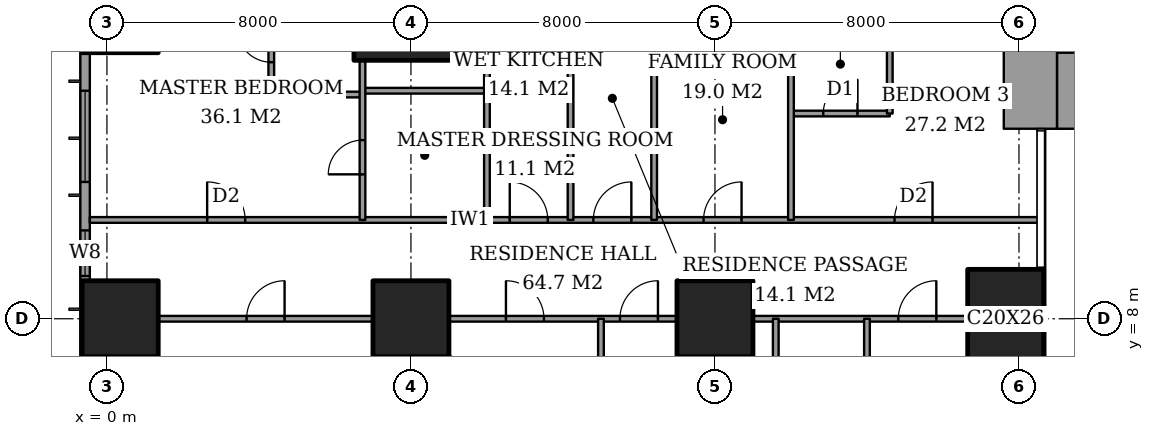
"""IFC4 building model, lengths in metres.
Left out: names, types, materials, properties, quantities, classifications, styles, units other than length and angle.
Written with IfcOpenShell. Run it as: python <this file> out.ifc"""

import sys

from ifc_helpers import new_model, si_unit, direction, frame, frame_2d, origin, origin_2d, place, context, subcontext, project, spatial, rectangle, extrude, element, fill, save


model = new_model("IFC4")
c1 = context("Model", 3, precision=1e-05, world=origin(), true_north=direction((0.0, 1.0)))
c2 = subcontext(c1, "Body", "Model", "MODEL_VIEW")
j1 = project(units=[si_unit("LENGTHUNIT", "METRE"), si_unit("PLANEANGLEUNIT", "RADIAN")], contexts=[c1])
p1 = place(None, origin())
s1 = spatial("IfcSite", under=j1, at=p1, CompositionType="ELEMENT")
p2 = place(p1, origin())
s2 = spatial("IfcBuilding", under=s1, at=p2, CompositionType="ELEMENT")
p3 = place(p2, frame((0.0, 0.0, 36.8)))
s3 = spatial("IfcBuildingStorey", under=s2, at=p3, CompositionType="ELEMENT", Elevation=36.8)
for number, where, z_axis, x_axis in (
    (1, (0.35, 8.0, 0.0), (0.0, 0.0, 1.0), (1.0, 0.0, 0.0)),
    (2, (8.0, 8.0, 0.0), (0.0, 0.0, 1.0), (1.0, 0.0, 0.0)),
):
    element("IfcColumn", number, at=place(p3, frame(where, z_axis=z_axis, x_axis=x_axis)), inside=s3, PredefinedType="COLUMN", context=c2, shape_type="SweptSolid", body=[
        extrude(rectangle(XDim=2.0, YDim=2.0, at=origin_2d()), origin(), (0.0, 0.0, 1.0), 3.6),
    ])
p4 = place(p3, frame((8.0, 16.0, 0.0), z_axis=(0.0, 0.0, 1.0), x_axis=(1.0, 0.0, 0.0)))
e3 = element("IfcColumn", 3, at=p4, inside=s3, PredefinedType="COLUMN", context=c2, shape_type="SweptSolid", body=[
    extrude(rectangle(XDim=3.0, YDim=2.4, at=origin_2d()), origin(), (0.0, 0.0, 1.0), 3.6),
])
p5 = place(p3, frame((16.0, 8.0, 0.0), z_axis=(0.0, 0.0, 1.0), x_axis=(1.0, 0.0, 0.0)))
e4 = element("IfcColumn", 4, at=p5, inside=s3, PredefinedType="COLUMN", context=c2, shape_type="SweptSolid", body=[
    extrude(rectangle(XDim=2.0, YDim=2.0, at=origin_2d()), origin(), (0.0, 0.0, 1.0), 3.6),
])
p6 = place(p3, frame((16.0, 16.0, 0.0), z_axis=(0.0, 0.0, 1.0), x_axis=(1.0, 0.0, 0.0)))
e5 = element("IfcColumn", 5, at=p6, inside=s3, PredefinedType="COLUMN", context=c2, shape_type="SweptSolid", body=[
    extrude(rectangle(XDim=3.0, YDim=2.4, at=origin_2d()), origin(), (0.0, 0.0, 1.0), 3.6),
])
p7 = place(p3, frame((23.65, 8.0, 0.0), z_axis=(0.0, 0.0, 1.0), x_axis=(1.0, 0.0, 0.0)))
e6 = element("IfcColumn", 6, at=p7, inside=s3, PredefinedType="COLUMN", context=c2, shape_type="SweptSolid", body=[
    extrude(rectangle(XDim=2.0, YDim=2.6, at=origin_2d()), origin(), (0.0, 0.0, 1.0), 3.6),
])
p8 = place(p3, frame((25.0, 14.0, 0.0), z_axis=(0.0, 0.0, 1.0), x_axis=(1.0, 0.0, 0.0)))
e7 = element("IfcWall", 7, at=p8, inside=s3, PredefinedType="SHEAR", context=c2, shape_type="SweptSolid", body=[
    extrude(rectangle(XDim=3.15, YDim=2.0, at=frame_2d((1.575, 0.0))), origin(), (0.0, 0.0, 1.0), 3.6),
])
p9 = place(p3, frame((24.3, 13.0, 0.0), z_axis=(0.0, 0.0, 1.0), x_axis=(0.0, 1.0, 0.0)))
e8 = element("IfcWall", 8, at=p9, inside=s3, PredefinedType="SHEAR", context=c2, shape_type="SweptSolid", body=[
    extrude(rectangle(XDim=10.15, YDim=1.4, at=frame_2d((5.075, 0.0))), origin(), (0.0, 0.0, 1.0), 3.6),
])
p10 = place(p3, frame((-0.575, 44.825, 0.0), z_axis=(0.0, 0.0, 1.0), x_axis=(0.0, -1.0, 0.0)))
e9 = element("IfcWall", 9, at=p10, inside=s3, PredefinedType="SOLIDWALL", context=c2, shape_type="SweptSolid", body=[
    extrude(rectangle(XDim=41.65, YDim=0.25, at=frame_2d((20.825, 0.0))), origin(), (0.0, 0.0, 1.0), 3.6),
])
p11 = place(p10, frame((0.775, 0.0, 0.6)))
e10 = element("IfcOpeningElement", 10, at=p11, cuts=e9, PredefinedType="OPENING", context=c2, shape_type="SweptSolid", body=[
    extrude(rectangle(XDim=2.4, YDim=2.0, at=frame_2d((1.2, 1.0))), frame((0.0, 0.135, 0.0), z_axis=(0.0, -1.0, 0.0), x_axis=(1.0, 0.0, 0.0)), (0.0, 0.0, 1.0), 0.27),
])
p12 = place(p10, frame((6.1, 0.0, 0.6)))
e11 = element("IfcOpeningElement", 11, at=p12, cuts=e9, PredefinedType="OPENING", context=c2, shape_type="SweptSolid", body=[
    extrude(rectangle(XDim=1.2, YDim=2.0, at=frame_2d((0.6, 1.0))), frame((0.0, 0.135, 0.0), z_axis=(0.0, -1.0, 0.0), x_axis=(1.0, 0.0, 0.0)), (0.0, 0.0, 1.0), 0.27),
])
p13 = place(p10, frame((8.425, 0.0, 0.6)))
e12 = element("IfcOpeningElement", 12, at=p13, cuts=e9, PredefinedType="OPENING", context=c2, shape_type="SweptSolid", body=[
    extrude(rectangle(XDim=2.4, YDim=2.0, at=frame_2d((1.2, 1.0))), frame((0.0, 0.135, 0.0), z_axis=(0.0, -1.0, 0.0), x_axis=(1.0, 0.0, 0.0)), (0.0, 0.0, 1.0), 0.27),
])
p14 = place(p10, frame((15.625, 0.0, 0.6)))
e13 = element("IfcOpeningElement", 13, at=p14, cuts=e9, PredefinedType="OPENING", context=c2, shape_type="SweptSolid", body=[
    extrude(rectangle(XDim=2.4, YDim=2.0, at=frame_2d((1.2, 1.0))), frame((0.0, 0.135, 0.0), z_axis=(0.0, -1.0, 0.0), x_axis=(1.0, 0.0, 0.0)), (0.0, 0.0, 1.0), 0.27),
])
p15 = place(p10, frame((23.625, 0.0, 0.6)))
e14 = element("IfcOpeningElement", 14, at=p15, cuts=e9, PredefinedType="OPENING", context=c2, shape_type="SweptSolid", body=[
    extrude(rectangle(XDim=2.4, YDim=2.0, at=frame_2d((1.2, 1.0))), frame((0.0, 0.135, 0.0), z_axis=(0.0, -1.0, 0.0), x_axis=(1.0, 0.0, 0.0)), (0.0, 0.0, 1.0), 0.27),
])
p16 = place(p10, frame((30.825, 0.0, 0.6)))
e15 = element("IfcOpeningElement", 15, at=p16, cuts=e9, PredefinedType="OPENING", context=c2, shape_type="SweptSolid", body=[
    extrude(rectangle(XDim=2.4, YDim=2.0, at=frame_2d((1.2, 1.0))), frame((0.0, 0.135, 0.0), z_axis=(0.0, -1.0, 0.0), x_axis=(1.0, 0.0, 0.0)), (0.0, 0.0, 1.0), 0.27),
])
p17 = place(p10, frame((34.5, 0.0, 0.6)))
e16 = element("IfcOpeningElement", 16, at=p17, cuts=e9, PredefinedType="OPENING", context=c2, shape_type="SweptSolid", body=[
    extrude(rectangle(XDim=1.2, YDim=2.0, at=frame_2d((0.6, 1.0))), frame((0.0, 0.135, 0.0), z_axis=(0.0, -1.0, 0.0), x_axis=(1.0, 0.0, 0.0)), (0.0, 0.0, 1.0), 0.27),
])
p18 = place(p10, frame((38.475, 0.0, 0.6)))
e17 = element("IfcOpeningElement", 17, at=p18, cuts=e9, PredefinedType="OPENING", context=c2, shape_type="SweptSolid", body=[
    extrude(rectangle(XDim=2.4, YDim=2.0, at=frame_2d((1.2, 1.0))), frame((0.0, 0.135, 0.0), z_axis=(0.0, -1.0, 0.0), x_axis=(1.0, 0.0, 0.0)), (0.0, 0.0, 1.0), 0.27),
])
p19 = place(p3, frame((1.35, 8.0, 0.0), z_axis=(0.0, 0.0, 1.0), x_axis=(1.0, 0.0, 0.0)))
e18 = element("IfcWall", 18, at=p19, inside=s3, PredefinedType="PARTITIONING", context=c2, shape_type="SweptSolid", body=[
    extrude(rectangle(XDim=5.65, YDim=0.15, at=frame_2d((2.825, 0.0))), origin(), (0.0, 0.0, 1.0), 3.35),
])
p20 = place(p19, frame((2.325, 0.0, 0.0)))
e19 = element("IfcOpeningElement", 19, at=p20, cuts=e18, PredefinedType="OPENING", context=c2, shape_type="SweptSolid", body=[
    extrude(rectangle(XDim=1.0, YDim=2.1, at=frame_2d((0.5, 1.05))), frame((0.0, 0.085, 0.0), z_axis=(0.0, -1.0, 0.0), x_axis=(1.0, 0.0, 0.0)), (0.0, 0.0, 1.0), 0.17),
])
p21 = place(p3, frame((9.0, 8.0, 0.0), z_axis=(0.0, 0.0, 1.0), x_axis=(1.0, 0.0, 0.0)))
e20 = element("IfcWall", 20, at=p21, inside=s3, PredefinedType="PARTITIONING", context=c2, shape_type="SweptSolid", body=[
    extrude(rectangle(XDim=6.0, YDim=0.15, at=frame_2d((3.0, 0.0))), origin(), (0.0, 0.0, 1.0), 3.35),
])
p22 = place(p21, frame((1.5, 0.0, 0.0)))
e21 = element("IfcOpeningElement", 21, at=p22, cuts=e20, PredefinedType="OPENING", context=c2, shape_type="SweptSolid", body=[
    extrude(rectangle(XDim=1.0, YDim=2.1, at=frame_2d((0.5, 1.05))), frame((0.0, 0.085, 0.0), z_axis=(0.0, -1.0, 0.0), x_axis=(1.0, 0.0, 0.0)), (0.0, 0.0, 1.0), 0.17),
])
p23 = place(p21, frame((4.5, 0.0, 0.0)))
e22 = element("IfcOpeningElement", 22, at=p23, cuts=e20, PredefinedType="OPENING", context=c2, shape_type="SweptSolid", body=[
    extrude(rectangle(XDim=1.0, YDim=2.1, at=frame_2d((0.5, 1.05))), frame((0.0, 0.085, 0.0), z_axis=(0.0, -1.0, 0.0), x_axis=(1.0, 0.0, 0.0)), (0.0, 0.0, 1.0), 0.17),
])
p24 = place(p3, frame((17.0, 8.0, 0.0), z_axis=(0.0, 0.0, 1.0), x_axis=(1.0, 0.0, 0.0)))
e23 = element("IfcWall", 23, at=p24, inside=s3, PredefinedType="PARTITIONING", context=c2, shape_type="SweptSolid", body=[
    extrude(rectangle(XDim=5.65, YDim=0.15, at=frame_2d((2.825, 0.0))), origin(), (0.0, 0.0, 1.0), 3.35),
])
p25 = place(p24, frame((3.825, 0.0, 0.0)))
e24 = element("IfcOpeningElement", 24, at=p25, cuts=e23, PredefinedType="OPENING", context=c2, shape_type="SweptSolid", body=[
    extrude(rectangle(XDim=1.0, YDim=2.1, at=frame_2d((0.5, 1.05))), frame((0.0, 0.085, 0.0), z_axis=(0.0, -1.0, 0.0), x_axis=(1.0, 0.0, 0.0)), (0.0, 0.0, 1.0), 0.17),
])
p26 = place(p3, frame((-0.45, 10.6, 0.0), z_axis=(0.0, 0.0, 1.0), x_axis=(1.0, 0.0, 0.0)))
e25 = element("IfcWall", 25, at=p26, inside=s3, PredefinedType="PARTITIONING", context=c2, shape_type="SweptSolid", body=[
    extrude(rectangle(XDim=25.011, YDim=0.15, at=frame_2d((12.505, 0.0))), origin(), (0.0, 0.0, 1.0), 3.35),
])
p27 = place(p26, frame((13.25, 0.0, 0.0)))
e26 = element("IfcOpeningElement", 26, at=p27, cuts=e25, PredefinedType="OPENING", context=c2, shape_type="SweptSolid", body=[
    extrude(rectangle(XDim=1.0, YDim=2.1, at=frame_2d((0.5, 1.05))), frame((0.0, 0.085, 0.0), z_axis=(0.0, -1.0, 0.0), x_axis=(1.0, 0.0, 0.0)), (0.0, 0.0, 1.0), 0.17),
])
p28 = place(p26, frame((3.087, 0.0, 0.0)))
e27 = element("IfcOpeningElement", 27, at=p28, cuts=e25, PredefinedType="OPENING", context=c2, shape_type="SweptSolid", body=[
    extrude(rectangle(XDim=1.0, YDim=2.1, at=frame_2d((0.5, 1.05))), frame((0.0, 0.085, 0.0), z_axis=(0.0, -1.0, 0.0), x_axis=(1.0, 0.0, 0.0)), (0.0, 0.0, 1.0), 0.17),
])
p29 = place(p26, frame((11.05, 0.0, 0.0)))
e28 = element("IfcOpeningElement", 28, at=p29, cuts=e25, PredefinedType="OPENING", context=c2, shape_type="SweptSolid", body=[
    extrude(rectangle(XDim=1.0, YDim=2.1, at=frame_2d((0.5, 1.05))), frame((0.0, 0.085, 0.0), z_axis=(0.0, -1.0, 0.0), x_axis=(1.0, 0.0, 0.0)), (0.0, 0.0, 1.0), 0.17),
])
p30 = place(p26, frame((16.15, 0.0, 0.0)))
e29 = element("IfcOpeningElement", 29, at=p30, cuts=e25, PredefinedType="OPENING", context=c2, shape_type="SweptSolid", body=[
    extrude(rectangle(XDim=1.0, YDim=2.1, at=frame_2d((0.5, 1.05))), frame((0.0, 0.085, 0.0), z_axis=(0.0, -1.0, 0.0), x_axis=(1.0, 0.0, 0.0)), (0.0, 0.0, 1.0), 0.17),
])
p31 = place(p26, frame((21.175, 0.0, 0.0)))
e30 = element("IfcOpeningElement", 30, at=p31, cuts=e25, PredefinedType="OPENING", context=c2, shape_type="SweptSolid", body=[
    extrude(rectangle(XDim=1.0, YDim=2.1, at=frame_2d((0.5, 1.05))), frame((0.0, 0.085, 0.0), z_axis=(0.0, -1.0, 0.0), x_axis=(1.0, 0.0, 0.0)), (0.0, 0.0, 1.0), 0.17),
])
p32 = place(p3, frame((18.0, 13.4, 0.0), z_axis=(0.0, 0.0, 1.0), x_axis=(1.0, 0.0, 0.0)))
e31 = element("IfcWall", 31, at=p32, inside=s3, PredefinedType="PARTITIONING", context=c2, shape_type="SweptSolid", body=[
    extrude(rectangle(XDim=2.6, YDim=0.15, at=frame_2d((1.3, 0.0))), origin(), (0.0, 0.0, 1.0), 3.35),
])
p33 = place(p32, frame((0.85, 0.0, 0.0)))
e32 = element("IfcOpeningElement", 32, at=p33, cuts=e31, PredefinedType="OPENING", context=c2, shape_type="SweptSolid", body=[
    extrude(rectangle(XDim=0.9, YDim=2.1, at=frame_2d((0.45, 1.05))), frame((0.0, 0.085, 0.0), z_axis=(0.0, -1.0, 0.0), x_axis=(1.0, 0.0, 0.0)), (0.0, 0.0, 1.0), 0.17),
])
p34 = place(p3, frame((4.325, 13.9, 0.0), z_axis=(0.0, 0.0, 1.0), x_axis=(1.0, 0.0, 0.0)))
e33 = element("IfcWall", 33, at=p34, inside=s3, PredefinedType="PARTITIONING", context=c2, shape_type="SweptSolid", body=[
    extrude(rectangle(XDim=2.4, YDim=0.15, at=frame_2d((1.2, 0.0))), origin(), (0.0, 0.0, 1.0), 3.35),
])
p35 = place(p3, frame((6.725, 14.0, 0.0), z_axis=(0.0, 0.0, 1.0), x_axis=(1.0, 0.0, 0.0)))
e34 = element("IfcWall", 34, at=p35, inside=s3, PredefinedType="PARTITIONING", context=c2, shape_type="SweptSolid", body=[
    extrude(rectangle(XDim=3.275, YDim=0.15, at=frame_2d((1.637, 0.0))), origin(), (0.0, 0.0, 1.0), 3.35),
])
p36 = place(p3, frame((4.325, 13.9, 0.0), z_axis=(0.0, 0.0, 1.0), x_axis=(0.0, 1.0, 0.0)))
e35 = element("IfcWall", 35, at=p36, inside=s3, PredefinedType="PARTITIONING", context=c2, shape_type="SweptSolid", body=[
    extrude(rectangle(XDim=2.6, YDim=0.15, at=frame_2d((1.3, 0.0))), origin(), (0.0, 0.0, 1.0), 3.35),
])
p37 = place(p36, frame((0.85, 0.0, 0.0)))
e36 = element("IfcOpeningElement", 36, at=p37, cuts=e35, PredefinedType="OPENING", context=c2, shape_type="SweptSolid", body=[
    extrude(rectangle(XDim=0.9, YDim=2.1, at=frame_2d((0.45, 1.05))), frame((0.0, 0.085, 0.0), z_axis=(0.0, -1.0, 0.0), x_axis=(1.0, 0.0, 0.0)), (0.0, 0.0, 1.0), 0.17),
])
p38 = place(p3, frame((6.725, 10.6, 0.0), z_axis=(0.0, 0.0, 1.0), x_axis=(0.0, 1.0, 0.0)))
e37 = element("IfcWall", 37, at=p38, inside=s3, PredefinedType="PARTITIONING", context=c2, shape_type="SweptSolid", body=[
    extrude(rectangle(XDim=4.2, YDim=0.15, at=frame_2d((2.1, 0.0))), origin(), (0.0, 0.0, 1.0), 3.35),
])
p39 = place(p38, frame((1.2, 0.0, 0.0)))
e38 = element("IfcOpeningElement", 38, at=p39, cuts=e37, PredefinedType="OPENING", context=c2, shape_type="SweptSolid", body=[
    extrude(rectangle(XDim=0.9, YDim=2.1, at=frame_2d((0.45, 1.05))), frame((0.0, 0.085, 0.0), z_axis=(0.0, -1.0, 0.0), x_axis=(1.0, 0.0, 0.0)), (0.0, 0.0, 1.0), 0.17),
])
p40 = place(p3, frame((10.0, 10.6, 0.0), z_axis=(0.0, 0.0, 1.0), x_axis=(0.0, 1.0, 0.0)))
e39 = element("IfcWall", 39, at=p40, inside=s3, PredefinedType="PARTITIONING", context=c2, shape_type="SweptSolid", body=[
    extrude(rectangle(XDim=11.0, YDim=0.15, at=frame_2d((5.5, 0.0))), origin(), (0.0, 0.0, 1.0), 3.35),
])
p41 = place(p40, frame((8.2, 0.0, 0.0)))
e40 = element("IfcOpeningElement", 40, at=p41, cuts=e39, PredefinedType="OPENING", context=c2, shape_type="SweptSolid", body=[
    extrude(rectangle(XDim=1.0, YDim=2.1, at=frame_2d((0.5, 1.05))), frame((0.0, 0.085, 0.0), z_axis=(0.0, -1.0, 0.0), x_axis=(1.0, 0.0, 0.0)), (0.0, 0.0, 1.0), 0.17),
])
p42 = place(p3, frame((12.2, 10.6, 0.0), z_axis=(0.0, 0.0, 1.0), x_axis=(0.0, 1.0, 0.0)))
e41 = element("IfcWall", 41, at=p42, inside=s3, PredefinedType="PARTITIONING", context=c2, shape_type="SweptSolid", body=[
    extrude(rectangle(XDim=6.4, YDim=0.15, at=frame_2d((3.2, 0.0))), origin(), (0.0, 0.0, 1.0), 3.35),
])
p43 = place(p3, frame((13.0, -0.45, 0.0), z_axis=(0.0, 0.0, 1.0), x_axis=(0.0, 1.0, 0.0)))
e42 = element("IfcWall", 42, at=p43, inside=s3, PredefinedType="PARTITIONING", context=c2, shape_type="SweptSolid", body=[
    extrude(rectangle(XDim=8.45, YDim=0.15, at=frame_2d((4.225, 0.0))), origin(), (0.0, 0.0, 1.0), 3.35),
])
p44 = place(p3, frame((14.4, 10.6, 0.0), z_axis=(0.0, 0.0, 1.0), x_axis=(0.0, 1.0, 0.0)))
e43 = element("IfcWall", 43, at=p44, inside=s3, PredefinedType="PARTITIONING", context=c2, shape_type="SweptSolid", body=[
    extrude(rectangle(XDim=6.4, YDim=0.15, at=frame_2d((3.2, 0.0))), origin(), (0.0, 0.0, 1.0), 3.35),
])
p45 = place(p3, frame((17.6, -0.45, 0.0), z_axis=(0.0, 0.0, 1.0), x_axis=(0.0, 1.0, 0.0)))
e44 = element("IfcWall", 44, at=p45, inside=s3, PredefinedType="PARTITIONING", context=c2, shape_type="SweptSolid", body=[
    extrude(rectangle(XDim=8.45, YDim=0.15, at=frame_2d((4.225, 0.0))), origin(), (0.0, 0.0, 1.0), 3.35),
])
p46 = place(p3, frame((18.0, 10.6, 0.0), z_axis=(0.0, 0.0, 1.0), x_axis=(0.0, 1.0, 0.0)))
e45 = element("IfcWall", 45, at=p46, inside=s3, PredefinedType="PARTITIONING", context=c2, shape_type="SweptSolid", body=[
    extrude(rectangle(XDim=6.4, YDim=0.15, at=frame_2d((3.2, 0.0))), origin(), (0.0, 0.0, 1.0), 3.35),
])
p47 = place(p3, frame((20.0, -0.45, 0.0), z_axis=(0.0, 0.0, 1.0), x_axis=(0.0, 1.0, 0.0)))
e46 = element("IfcWall", 46, at=p47, inside=s3, PredefinedType="PARTITIONING", context=c2, shape_type="SweptSolid", body=[
    extrude(rectangle(XDim=8.45, YDim=0.15, at=frame_2d((4.225, 0.0))), origin(), (0.0, 0.0, 1.0), 3.35),
])
p48 = place(p47, frame((3.775, 0.0, 0.0)))
e47 = element("IfcOpeningElement", 47, at=p48, cuts=e46, PredefinedType="OPENING", context=c2, shape_type="SweptSolid", body=[
    extrude(rectangle(XDim=0.9, YDim=2.1, at=frame_2d((0.45, 1.05))), frame((0.0, 0.085, 0.0), z_axis=(0.0, -1.0, 0.0), x_axis=(1.0, 0.0, 0.0)), (0.0, 0.0, 1.0), 0.17),
])
p49 = place(p3, frame((20.6, 13.4, 0.0), z_axis=(0.0, 0.0, 1.0), x_axis=(0.0, 1.0, 0.0)))
e48 = element("IfcWall", 48, at=p49, inside=s3, PredefinedType="PARTITIONING", context=c2, shape_type="SweptSolid", body=[
    extrude(rectangle(XDim=2.6, YDim=0.15, at=frame_2d((1.3, 0.0))), origin(), (0.0, 0.0, 1.0), 3.35),
])
p50 = place(p16, origin())
e49 = element("IfcWindow", 49, at=p50, inside=s3, PartitioningType="SINGLE_PANEL", PredefinedType="WINDOW", context=c2, shape_type="SweptSolid", body=[
    extrude(rectangle(XDim=2.4, YDim=2.0, at=frame_2d((1.2, 1.0))), frame((0.0, 0.03, 0.0), z_axis=(0.0, -1.0, 0.0), x_axis=(1.0, 0.0, 0.0)), (0.0, 0.0, 1.0), 0.06),
])
fill(e15, e49)
p51 = place(p17, origin())
e50 = element("IfcWindow", 50, at=p51, inside=s3, PartitioningType="SINGLE_PANEL", PredefinedType="WINDOW", context=c2, shape_type="SweptSolid", body=[
    extrude(rectangle(XDim=1.2, YDim=2.0, at=frame_2d((0.6, 1.0))), frame((0.0, 0.03, 0.0), z_axis=(0.0, -1.0, 0.0), x_axis=(1.0, 0.0, 0.0)), (0.0, 0.0, 1.0), 0.06),
])
fill(e16, e50)
p52 = place(p20, origin())
e51 = element("IfcDoor", 51, at=p52, inside=s3, OperationType="SINGLE_SWING_LEFT", PredefinedType="DOOR", context=c2, shape_type="SweptSolid", body=[
    extrude(rectangle(XDim=1.0, YDim=2.1, at=frame_2d((0.5, 1.05))), frame((0.0, 0.025, 0.0), z_axis=(0.0, -1.0, 0.0), x_axis=(1.0, 0.0, 0.0)), (0.0, 0.0, 1.0), 0.05),
])
fill(e19, e51)
p53 = place(p22, origin())
e52 = element("IfcDoor", 52, at=p53, inside=s3, OperationType="SINGLE_SWING_RIGHT", PredefinedType="DOOR", context=c2, shape_type="SweptSolid", body=[
    extrude(rectangle(XDim=1.0, YDim=2.1, at=frame_2d((0.5, 1.05))), frame((0.0, 0.025, 0.0), z_axis=(0.0, -1.0, 0.0), x_axis=(1.0, 0.0, 0.0)), (0.0, 0.0, 1.0), 0.05),
])
fill(e21, e52)
p54 = place(p23, origin())
e53 = element("IfcDoor", 53, at=p54, inside=s3, OperationType="SINGLE_SWING_LEFT", PredefinedType="DOOR", context=c2, shape_type="SweptSolid", body=[
    extrude(rectangle(XDim=1.0, YDim=2.1, at=frame_2d((0.5, 1.05))), frame((0.0, 0.025, 0.0), z_axis=(0.0, -1.0, 0.0), x_axis=(1.0, 0.0, 0.0)), (0.0, 0.0, 1.0), 0.05),
])
fill(e22, e53)
p55 = place(p25, origin())
e54 = element("IfcDoor", 54, at=p55, inside=s3, OperationType="SINGLE_SWING_LEFT", PredefinedType="DOOR", context=c2, shape_type="SweptSolid", body=[
    extrude(rectangle(XDim=1.0, YDim=2.1, at=frame_2d((0.5, 1.05))), frame((0.0, 0.025, 0.0), z_axis=(0.0, -1.0, 0.0), x_axis=(1.0, 0.0, 0.0)), (0.0, 0.0, 1.0), 0.05),
])
fill(e24, e54)
p56 = place(p27, origin())
e55 = element("IfcDoor", 55, at=p56, inside=s3, OperationType="SINGLE_SWING_LEFT", PredefinedType="DOOR", context=c2, shape_type="SweptSolid", body=[
    extrude(rectangle(XDim=1.0, YDim=2.1, at=frame_2d((0.5, 1.05))), frame((0.0, 0.025, 0.0), z_axis=(0.0, -1.0, 0.0), x_axis=(1.0, 0.0, 0.0)), (0.0, 0.0, 1.0), 0.05),
])
fill(e26, e55)
p57 = place(p37, origin())
e56 = element("IfcDoor", 56, at=p57, inside=s3, OperationType="SINGLE_SWING_LEFT", PredefinedType="DOOR", context=c2, shape_type="SweptSolid", body=[
    extrude(rectangle(XDim=0.9, YDim=2.1, at=frame_2d((0.45, 1.05))), frame((0.0, 0.025, 0.0), z_axis=(0.0, -1.0, 0.0), x_axis=(1.0, 0.0, 0.0)), (0.0, 0.0, 1.0), 0.05),
])
fill(e36, e56)
p58 = place(p28, origin())
e57 = element("IfcDoor", 57, at=p58, inside=s3, OperationType="SINGLE_SWING_RIGHT", PredefinedType="DOOR", context=c2, shape_type="SweptSolid", body=[
    extrude(rectangle(XDim=1.0, YDim=2.1, at=frame_2d((0.5, 1.05))), frame((0.0, 0.025, 0.0), z_axis=(0.0, -1.0, 0.0), x_axis=(1.0, 0.0, 0.0)), (0.0, 0.0, 1.0), 0.05),
])
fill(e27, e57)
p59 = place(p39, origin())
e58 = element("IfcDoor", 58, at=p59, inside=s3, OperationType="SINGLE_SWING_RIGHT", PredefinedType="DOOR", context=c2, shape_type="SweptSolid", body=[
    extrude(rectangle(XDim=0.9, YDim=2.1, at=frame_2d((0.45, 1.05))), frame((0.0, 0.025, 0.0), z_axis=(0.0, -1.0, 0.0), x_axis=(1.0, 0.0, 0.0)), (0.0, 0.0, 1.0), 0.05),
])
fill(e38, e58)
p60 = place(p29, origin())
e59 = element("IfcDoor", 59, at=p60, inside=s3, OperationType="SINGLE_SWING_RIGHT", PredefinedType="DOOR", context=c2, shape_type="SweptSolid", body=[
    extrude(rectangle(XDim=1.0, YDim=2.1, at=frame_2d((0.5, 1.05))), frame((0.0, 0.025, 0.0), z_axis=(0.0, -1.0, 0.0), x_axis=(1.0, 0.0, 0.0)), (0.0, 0.0, 1.0), 0.05),
])
fill(e28, e59)
p61 = place(p30, origin())
e60 = element("IfcDoor", 60, at=p61, inside=s3, OperationType="SINGLE_SWING_LEFT", PredefinedType="DOOR", context=c2, shape_type="SweptSolid", body=[
    extrude(rectangle(XDim=1.0, YDim=2.1, at=frame_2d((0.5, 1.05))), frame((0.0, 0.025, 0.0), z_axis=(0.0, -1.0, 0.0), x_axis=(1.0, 0.0, 0.0)), (0.0, 0.0, 1.0), 0.05),
])
fill(e29, e60)
p62 = place(p33, origin())
e61 = element("IfcDoor", 61, at=p62, inside=s3, OperationType="SINGLE_SWING_LEFT", PredefinedType="DOOR", context=c2, shape_type="SweptSolid", body=[
    extrude(rectangle(XDim=0.9, YDim=2.1, at=frame_2d((0.45, 1.05))), frame((0.0, 0.025, 0.0), z_axis=(0.0, -1.0, 0.0), x_axis=(1.0, 0.0, 0.0)), (0.0, 0.0, 1.0), 0.05),
])
fill(e32, e61)
p63 = place(p31, origin())
e62 = element("IfcDoor", 62, at=p63, inside=s3, OperationType="SINGLE_SWING_LEFT", PredefinedType="DOOR", context=c2, shape_type="SweptSolid", body=[
    extrude(rectangle(XDim=1.0, YDim=2.1, at=frame_2d((0.5, 1.05))), frame((0.0, 0.025, 0.0), z_axis=(0.0, -1.0, 0.0), x_axis=(1.0, 0.0, 0.0)), (0.0, 0.0, 1.0), 0.05),
])
fill(e30, e62)
save(model, sys.argv[1])
